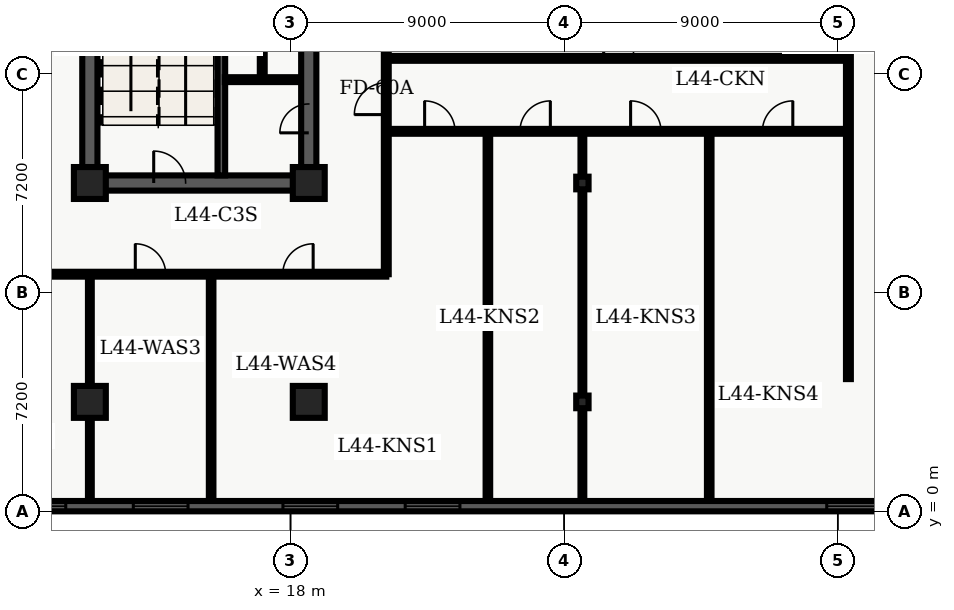
"""IFC4 building model, lengths in metres.
Left out: names, types, materials, properties, quantities, classifications, styles, units other than length and angle.
Written with IfcOpenShell. Run it as: python <this file> out.ifc"""

import sys

from ifc_helpers import new_model, entity, si_unit, converted_unit, direction, frame, origin_with_axes, origin_2d_with_axis, place, context, subcontext, project, spatial, polyline, rectangle, i_section, outline, extrude, element, fill, save


model = new_model("IFC4")
c1 = context("Model", 3, precision=1e-05, world=origin_with_axes(), true_north=direction((0.0, 1.0)))
c2 = subcontext(c1, "Body", "Model", "MODEL_VIEW")
j1 = project(units=[si_unit("LENGTHUNIT", "METRE"), converted_unit("PLANEANGLEUNIT", "DEGREE", entity("IfcPlaneAngleMeasure", 0.017), si_unit("PLANEANGLEUNIT", "RADIAN"), dimensions=[0, 0, 0, 0, 0, 0, 0])], contexts=[c1])
p1 = place(None, origin_with_axes())
s1 = spatial("IfcSite", under=j1, at=p1, CompositionType="ELEMENT")
p2 = place(p1, origin_with_axes())
s2 = spatial("IfcBuilding", under=s1, at=p2, CompositionType="ELEMENT")
p3 = place(p2, frame((0.0, 0.0, 179.7), z_axis=(0.0, 0.0, 1.0), x_axis=(1.0, 0.0, 0.0)))
s3 = spatial("IfcBuildingStorey", under=s2, at=p3, CompositionType="ELEMENT", Elevation=179.7)
p4 = place(p3, frame((11.4, 10.8, 0.0), z_axis=(0.0, 0.0, 1.0), x_axis=(0.0, 1.0, 0.0)))
e1 = element("IfcWall", 1, at=p4, inside=s3, PredefinedType="SHEAR", context=c2, shape_type="SweptSolid", body=[
    extrude(outline(polyline([(0.0, -0.25), (27.0, -0.25), (27.0, 0.25), (0.0, 0.25), (0.0, -0.25)])), origin_with_axes(), (0.0, 0.0, 1.0), 3.66),
])
p5 = place(p3, frame((11.4, 10.8, 0.0), z_axis=(0.0, 0.0, 1.0), x_axis=(1.0, 0.0, 0.0)))
e2 = element("IfcWall", 2, at=p5, inside=s3, PredefinedType="SHEAR", context=c2, shape_type="SweptSolid", body=[
    extrude(outline(polyline([(0.0, -0.25), (7.2, -0.25), (7.2, 0.25), (0.0, 0.25), (0.0, -0.25)])), origin_with_axes(), (0.0, 0.0, 1.0), 3.66),
])
p6 = place(p5, frame((2.625, 0.0, 0.0), z_axis=(0.0, 0.0, 1.0), x_axis=(1.0, 0.0, 0.0)))
e3 = element("IfcOpeningElement", 3, at=p6, cuts=e2, PredefinedType="OPENING", context=c2, shape_type="SweptSolid", body=[
    extrude(rectangle(XDim=1.05, YDim=0.52, at=origin_2d_with_axis()), origin_with_axes(), (0.0, 0.0, 1.0), 2.15),
])
p7 = place(p3, frame((18.6, 10.8, 0.0), z_axis=(0.0, 0.0, 1.0), x_axis=(0.0, 1.0, 0.0)))
e4 = element("IfcWall", 4, at=p7, inside=s3, PredefinedType="SHEAR", context=c2, shape_type="SweptSolid", body=[
    extrude(outline(polyline([(0.0, -0.25), (13.5, -0.25), (13.5, 0.25), (0.0, 0.25), (0.0, -0.25)])), origin_with_axes(), (0.0, 0.0, 1.0), 3.66),
])
p8 = place(p7, frame((11.125, 0.0, 0.0), z_axis=(0.0, 0.0, 1.0), x_axis=(1.0, 0.0, 0.0)))
e5 = element("IfcOpeningElement", 5, at=p8, cuts=e4, PredefinedType="OPENING", context=c2, shape_type="SweptSolid", body=[
    extrude(rectangle(XDim=1.05, YDim=0.52, at=origin_2d_with_axis()), origin_with_axes(), (0.0, 0.0, 1.0), 2.15),
])
p9 = place(p7, frame((2.125, 0.0, 0.0), z_axis=(0.0, 0.0, 1.0), x_axis=(1.0, 0.0, 0.0)))
e6 = element("IfcOpeningElement", 6, at=p9, cuts=e4, PredefinedType="OPENING", context=c2, shape_type="SweptSolid", body=[
    extrude(rectangle(XDim=0.95, YDim=0.52, at=origin_2d_with_axis()), origin_with_axes(), (0.0, 0.0, 1.0), 2.15),
])
p10 = place(p7, frame((6.275, 0.0, 0.0), z_axis=(0.0, 0.0, 1.0), x_axis=(1.0, 0.0, 0.0)))
e7 = element("IfcOpeningElement", 7, at=p10, cuts=e4, PredefinedType="OPENING", context=c2, shape_type="SweptSolid", body=[
    extrude(rectangle(XDim=0.95, YDim=0.52, at=origin_2d_with_axis()), origin_with_axes(), (0.0, 0.0, 1.0), 2.15),
])
p11 = place(p3, frame((15.725, 11.05, 0.0), z_axis=(0.0, 0.0, 1.0), x_axis=(0.0, 1.0, 0.0)))
e8 = element("IfcWall", 8, at=p11, inside=s3, PredefinedType="SHEAR", context=c2, shape_type="SweptSolid", body=[
    extrude(outline(polyline([(0.0, -0.125), (8.65, -0.125), (8.65, 0.125), (0.0, 0.125), (0.0, -0.125)])), origin_with_axes(), (0.0, 0.0, 1.0), 3.66),
])
for number, where, z_axis, x_axis in (
    (9, (11.4, 3.6, 0.0), (0.0, 0.0, 1.0), (1.0, 0.0, 0.0)),
    (10, (11.4, 10.8, 0.0), (0.0, 0.0, 1.0), (1.0, 0.0, 0.0)),
    (11, (18.6, 3.6, 0.0), (0.0, 0.0, 1.0), (1.0, 0.0, 0.0)),
    (12, (18.6, 10.8, 0.0), (0.0, 0.0, 1.0), (1.0, 0.0, 0.0)),
):
    element("IfcColumn", number, at=place(p3, frame(where, z_axis=z_axis, x_axis=x_axis)), inside=s3, PredefinedType="COLUMN", context=c2, shape_type="SweptSolid", body=[
        extrude(rectangle(XDim=1.05, YDim=1.05, at=origin_2d_with_axis()), origin_with_axes(), (0.0, 0.0, 1.0), 3.9),
    ])
for number, where, z_axis, x_axis in (
    (13, (27.6, 3.6, 0.0), (0.0, 0.0, 1.0), (1.0, 0.0, 0.0)),
    (14, (27.6, 10.8, 0.0), (0.0, 0.0, 1.0), (1.0, 0.0, 0.0)),
):
    element("IfcColumn", number, at=place(p3, frame(where, z_axis=z_axis, x_axis=x_axis)), inside=s3, PredefinedType="COLUMN", context=c2, shape_type="SweptSolid", body=[
        extrude(i_section(OverallWidth=0.406, OverallDepth=0.416, WebThickness=0.03, FlangeThickness=0.048, FilletRadius=0.022, at=origin_2d_with_axis()), origin_with_axes(), (0.0, 0.0, 1.0), 3.9),
    ])
p12 = place(p3, frame((15.84, 14.2, 0.0), z_axis=(0.0, 0.0, 1.0), x_axis=(1.0, 0.0, 0.0)))
e15 = element("IfcWall", 15, at=p12, inside=s3, PredefinedType="PARTITIONING", context=c2, shape_type="SweptSolid", body=[
    extrude(outline(polyline([(0.0, -0.08), (2.46, -0.08), (2.46, 0.08), (0.0, 0.08), (0.0, -0.08)])), origin_with_axes(), (0.0, 0.0, 1.0), 2.7),
])
p13 = place(p3, frame((17.07, 14.28, 0.0), z_axis=(0.0, 0.0, 1.0), x_axis=(0.0, 1.0, 0.0)))
e16 = element("IfcWall", 16, at=p13, inside=s3, PredefinedType="PARTITIONING", context=c2, shape_type="SweptSolid", body=[
    extrude(outline(polyline([(0.0, -0.08), (5.42, -0.08), (5.42, 0.08), (0.0, 0.08), (0.0, -0.08)])), origin_with_axes(), (0.0, 0.0, 1.0), 2.7),
])
p14 = place(p13, frame((2.6, 0.0, 0.0), z_axis=(0.0, 0.0, 1.0), x_axis=(1.0, 0.0, 0.0)))
e17 = element("IfcOpeningElement", 17, at=p14, cuts=e16, PredefinedType="OPENING", context=c2, shape_type="SweptSolid", body=[
    extrude(rectangle(XDim=0.9, YDim=0.18, at=origin_2d_with_axis()), origin_with_axes(), (0.0, 0.0, 1.0), 2.15),
])
p15 = place(p3, frame((2.6, 7.8, 0.0), z_axis=(0.0, 0.0, 1.0), x_axis=(1.0, 0.0, 0.0)))
e18 = element("IfcWall", 18, at=p15, inside=s3, PredefinedType="PARTITIONING", context=c2, shape_type="SweptSolid", body=[
    extrude(outline(polyline([(0.0, -0.08), (18.55, -0.08), (18.55, 0.08), (0.0, 0.08), (0.0, -0.08)])), origin_with_axes(), (0.0, 0.0, 1.0), 2.7),
])
p16 = place(p15, frame((1.851, 0.0, 0.0), z_axis=(0.0, 0.0, 1.0), x_axis=(1.0, 0.0, 0.0)))
e19 = element("IfcOpeningElement", 19, at=p16, cuts=e18, PredefinedType="OPENING", context=c2, shape_type="SweptSolid", body=[
    extrude(rectangle(XDim=1.0, YDim=0.18, at=origin_2d_with_axis()), origin_with_axes(), (0.0, 0.0, 1.0), 2.15),
])
p17 = place(p15, frame((6.255, 0.0, 0.0), z_axis=(0.0, 0.0, 1.0), x_axis=(1.0, 0.0, 0.0)))
e20 = element("IfcOpeningElement", 20, at=p17, cuts=e18, PredefinedType="OPENING", context=c2, shape_type="SweptSolid", body=[
    extrude(rectangle(XDim=1.0, YDim=0.18, at=origin_2d_with_axis()), origin_with_axes(), (0.0, 0.0, 1.0), 2.15),
])
p18 = place(p15, frame((10.794, 0.0, 0.0), z_axis=(0.0, 0.0, 1.0), x_axis=(1.0, 0.0, 0.0)))
e21 = element("IfcOpeningElement", 21, at=p18, cuts=e18, PredefinedType="OPENING", context=c2, shape_type="SweptSolid", body=[
    extrude(rectangle(XDim=1.0, YDim=0.18, at=origin_2d_with_axis()), origin_with_axes(), (0.0, 0.0, 1.0), 2.15),
])
p19 = place(p15, frame((15.645, 0.0, 0.0), z_axis=(0.0, 0.0, 1.0), x_axis=(1.0, 0.0, 0.0)))
e22 = element("IfcOpeningElement", 22, at=p19, cuts=e18, PredefinedType="OPENING", context=c2, shape_type="SweptSolid", body=[
    extrude(rectangle(XDim=1.0, YDim=0.18, at=origin_2d_with_axis()), origin_with_axes(), (0.0, 0.0, 1.0), 2.15),
])
p20 = place(p3, frame((21.15, 7.8, 0.0), z_axis=(0.0, 0.0, 1.0), x_axis=(0.0, 1.0, 0.0)))
e23 = element("IfcWall", 23, at=p20, inside=s3, PredefinedType="PARTITIONING", context=c2, shape_type="SweptSolid", body=[
    extrude(outline(polyline([(0.0, -0.08), (32.7, -0.08), (32.7, 0.08), (0.0, 0.08), (0.0, -0.08)])), origin_with_axes(), (0.0, 0.0, 1.0), 2.7),
])
p21 = place(p20, frame((16.495, 0.0, 0.0), z_axis=(0.0, 0.0, 1.0), x_axis=(1.0, 0.0, 0.0)))
e24 = element("IfcOpeningElement", 24, at=p21, cuts=e23, PredefinedType="OPENING", context=c2, shape_type="SweptSolid", body=[
    extrude(rectangle(XDim=1.0, YDim=0.18, at=origin_2d_with_axis()), origin_with_axes(), (0.0, 0.0, 1.0), 2.15),
])
p22 = place(p20, frame((22.148, 0.0, 0.0), z_axis=(0.0, 0.0, 1.0), x_axis=(1.0, 0.0, 0.0)))
e25 = element("IfcOpeningElement", 25, at=p22, cuts=e23, PredefinedType="OPENING", context=c2, shape_type="SweptSolid", body=[
    extrude(rectangle(XDim=1.0, YDim=0.18, at=origin_2d_with_axis()), origin_with_axes(), (0.0, 0.0, 1.0), 2.15),
])
p23 = place(p20, frame((28.902, 0.0, 0.0), z_axis=(0.0, 0.0, 1.0), x_axis=(1.0, 0.0, 0.0)))
e26 = element("IfcOpeningElement", 26, at=p23, cuts=e23, PredefinedType="OPENING", context=c2, shape_type="SweptSolid", body=[
    extrude(rectangle(XDim=1.0, YDim=0.18, at=origin_2d_with_axis()), origin_with_axes(), (0.0, 0.0, 1.0), 2.15),
])
p24 = place(p20, frame((5.775, 0.0, 0.0), z_axis=(0.0, 0.0, 1.0), x_axis=(1.0, 0.0, 0.0)))
e27 = element("IfcOpeningElement", 27, at=p24, cuts=e23, PredefinedType="OPENING", context=c2, shape_type="SweptSolid", body=[
    extrude(rectangle(XDim=1.05, YDim=0.18, at=origin_2d_with_axis()), origin_with_axes(), (0.0, 0.0, 1.0), 2.15),
])
p25 = place(p3, frame((11.4, 0.335, 0.0), z_axis=(0.0, 0.0, 1.0), x_axis=(0.0, 1.0, 0.0)))
e28 = element("IfcWall", 28, at=p25, inside=s3, PredefinedType="PARTITIONING", context=c2, shape_type="SweptSolid", body=[
    extrude(outline(polyline([(0.0, -0.062), (7.365, -0.062), (7.365, 0.062), (0.0, 0.062), (0.0, -0.062)])), origin_with_axes(), (0.0, 0.0, 1.0), 2.7),
])
p26 = place(p3, frame((15.389, 0.335, 0.0), z_axis=(0.0, 0.0, 1.0), x_axis=(0.0, 1.0, 0.0)))
e29 = element("IfcWall", 29, at=p26, inside=s3, PredefinedType="PARTITIONING", context=c2, shape_type="SweptSolid", body=[
    extrude(outline(polyline([(0.0, -0.075), (7.365, -0.075), (7.365, 0.075), (0.0, 0.075), (0.0, -0.075)])), origin_with_axes(), (0.0, 0.0, 1.0), 2.7),
])
p27 = place(p3, frame((21.15, 12.5, 0.0), z_axis=(0.0, 0.0, 1.0), x_axis=(1.0, 0.0, 0.0)))
e30 = element("IfcWall", 30, at=p27, inside=s3, PredefinedType="PARTITIONING", context=c2, shape_type="SweptSolid", body=[
    extrude(outline(polyline([(0.0, -0.08), (15.2, -0.08), (15.2, 0.08), (0.0, 0.08), (0.0, -0.08)])), origin_with_axes(), (0.0, 0.0, 1.0), 2.7),
])
p28 = place(p27, frame((1.761, 0.0, 0.0), z_axis=(0.0, 0.0, 1.0), x_axis=(1.0, 0.0, 0.0)))
e31 = element("IfcOpeningElement", 31, at=p28, cuts=e30, PredefinedType="OPENING", context=c2, shape_type="SweptSolid", body=[
    extrude(rectangle(XDim=1.0, YDim=0.18, at=origin_2d_with_axis()), origin_with_axes(), (0.0, 0.0, 1.0), 2.15),
])
p29 = place(p27, frame((4.896, 0.0, 0.0), z_axis=(0.0, 0.0, 1.0), x_axis=(1.0, 0.0, 0.0)))
e32 = element("IfcOpeningElement", 32, at=p29, cuts=e30, PredefinedType="OPENING", context=c2, shape_type="SweptSolid", body=[
    extrude(rectangle(XDim=1.0, YDim=0.18, at=origin_2d_with_axis()), origin_with_axes(), (0.0, 0.0, 1.0), 2.15),
])
p30 = place(p27, frame((8.536, 0.0, 0.0), z_axis=(0.0, 0.0, 1.0), x_axis=(1.0, 0.0, 0.0)))
e33 = element("IfcOpeningElement", 33, at=p30, cuts=e30, PredefinedType="OPENING", context=c2, shape_type="SweptSolid", body=[
    extrude(rectangle(XDim=1.0, YDim=0.18, at=origin_2d_with_axis()), origin_with_axes(), (0.0, 0.0, 1.0), 2.15),
])
p31 = place(p27, frame((12.871, 0.0, 0.0), z_axis=(0.0, 0.0, 1.0), x_axis=(1.0, 0.0, 0.0)))
e34 = element("IfcOpeningElement", 34, at=p31, cuts=e30, PredefinedType="OPENING", context=c2, shape_type="SweptSolid", body=[
    extrude(rectangle(XDim=1.0, YDim=0.18, at=origin_2d_with_axis()), origin_with_axes(), (0.0, 0.0, 1.0), 2.15),
])
p32 = place(p3, frame((21.15, 14.9, 0.0), z_axis=(0.0, 0.0, 1.0), x_axis=(1.0, 0.0, 0.0)))
e35 = element("IfcWall", 35, at=p32, inside=s3, PredefinedType="PARTITIONING", context=c2, shape_type="SweptSolid", body=[
    extrude(outline(polyline([(0.0, -0.08), (15.2, -0.08), (15.2, 0.08), (0.0, 0.08), (0.0, -0.08)])), origin_with_axes(), (0.0, 0.0, 1.0), 2.7),
])
p33 = place(p32, frame((7.65, 0.0, 0.0), z_axis=(0.0, 0.0, 1.0), x_axis=(1.0, 0.0, 0.0)))
e36 = element("IfcOpeningElement", 36, at=p33, cuts=e35, PredefinedType="OPENING", context=c2, shape_type="SweptSolid", body=[
    extrude(rectangle(XDim=1.0, YDim=0.18, at=origin_2d_with_axis()), origin_with_axes(), (0.0, 0.0, 1.0), 2.15),
])
p34 = place(p3, frame((36.35, 4.35, 0.0), z_axis=(0.0, 0.0, 1.0), x_axis=(0.0, 1.0, 0.0)))
e37 = element("IfcWall", 37, at=p34, inside=s3, PredefinedType="PARTITIONING", context=c2, shape_type="SweptSolid", body=[
    extrude(outline(polyline([(0.0, -0.08), (16.95, -0.08), (16.95, 0.08), (0.0, 0.08), (0.0, -0.08)])), origin_with_axes(), (0.0, 0.0, 1.0), 2.7),
])
p35 = place(p3, frame((24.492, 0.335, 0.0), z_axis=(0.0, 0.0, 1.0), x_axis=(0.0, 1.0, 0.0)))
e38 = element("IfcWall", 38, at=p35, inside=s3, PredefinedType="PARTITIONING", context=c2, shape_type="SweptSolid", body=[
    extrude(outline(polyline([(0.0, -0.075), (12.045, -0.075), (12.045, 0.075), (0.0, 0.075), (0.0, -0.075)])), origin_with_axes(), (0.0, 0.0, 1.0), 2.7),
])
p36 = place(p3, frame((27.6, 0.335, 0.0), z_axis=(0.0, 0.0, 1.0), x_axis=(0.0, 1.0, 0.0)))
e39 = element("IfcWall", 39, at=p36, inside=s3, PredefinedType="PARTITIONING", context=c2, shape_type="SweptSolid", body=[
    extrude(outline(polyline([(0.0, -0.062), (12.045, -0.062), (12.045, 0.062), (0.0, 0.062), (0.0, -0.062)])), origin_with_axes(), (0.0, 0.0, 1.0), 2.7),
])
p37 = place(p3, frame((31.772, 0.335, 0.0), z_axis=(0.0, 0.0, 1.0), x_axis=(0.0, 1.0, 0.0)))
e40 = element("IfcWall", 40, at=p37, inside=s3, PredefinedType="PARTITIONING", context=c2, shape_type="SweptSolid", body=[
    extrude(outline(polyline([(0.0, -0.075), (12.045, -0.075), (12.045, 0.075), (0.0, 0.075), (0.0, -0.075)])), origin_with_axes(), (0.0, 0.0, 1.0), 2.7),
])
p38 = place(p3, frame((57.26, 0.17, 0.0), z_axis=(0.0, 0.0, 1.0), x_axis=(-1.0, 0.0, 0.0)))
e41 = element("IfcWall", 41, at=p38, inside=s3, PredefinedType="SOLIDWALL", context=c2, shape_type="SweptSolid", body=[
    extrude(outline(polyline([(0.0, -0.17), (54.86, -0.17), (54.86, 0.17), (0.0, 0.17), (0.0, -0.17)])), origin_with_axes(), (0.0, 0.0, 1.0), 3.66),
])
p39 = place(p38, frame((2.836, 0.0, 0.45), z_axis=(0.0, 0.0, 1.0), x_axis=(1.0, 0.0, 0.0)))
e42 = element("IfcOpeningElement", 42, at=p39, cuts=e41, PredefinedType="OPENING", context=c2, shape_type="SweptSolid", body=[
    extrude(rectangle(XDim=1.8, YDim=0.36, at=origin_2d_with_axis()), origin_with_axes(), (0.0, 0.0, 1.0), 2.1),
])
p40 = place(p38, frame((7.307, 0.0, 0.45), z_axis=(0.0, 0.0, 1.0), x_axis=(1.0, 0.0, 0.0)))
e43 = element("IfcOpeningElement", 43, at=p40, cuts=e41, PredefinedType="OPENING", context=c2, shape_type="SweptSolid", body=[
    extrude(rectangle(XDim=1.8, YDim=0.36, at=origin_2d_with_axis()), origin_with_axes(), (0.0, 0.0, 1.0), 2.1),
])
p41 = place(p38, frame((11.779, 0.0, 0.45), z_axis=(0.0, 0.0, 1.0), x_axis=(1.0, 0.0, 0.0)))
e44 = element("IfcOpeningElement", 44, at=p41, cuts=e41, PredefinedType="OPENING", context=c2, shape_type="SweptSolid", body=[
    extrude(rectangle(XDim=1.8, YDim=0.36, at=origin_2d_with_axis()), origin_with_axes(), (0.0, 0.0, 1.0), 2.1),
])
p42 = place(p38, frame((16.251, 0.0, 0.45), z_axis=(0.0, 0.0, 1.0), x_axis=(1.0, 0.0, 0.0)))
e45 = element("IfcOpeningElement", 45, at=p42, cuts=e41, PredefinedType="OPENING", context=c2, shape_type="SweptSolid", body=[
    extrude(rectangle(XDim=1.8, YDim=0.36, at=origin_2d_with_axis()), origin_with_axes(), (0.0, 0.0, 1.0), 2.1),
])
p43 = place(p38, frame((20.723, 0.0, 0.45), z_axis=(0.0, 0.0, 1.0), x_axis=(1.0, 0.0, 0.0)))
e46 = element("IfcOpeningElement", 46, at=p43, cuts=e41, PredefinedType="OPENING", context=c2, shape_type="SweptSolid", body=[
    extrude(rectangle(XDim=1.8, YDim=0.36, at=origin_2d_with_axis()), origin_with_axes(), (0.0, 0.0, 1.0), 2.1),
])
p44 = place(p38, frame((34.588, 0.0, 0.45), z_axis=(0.0, 0.0, 1.0), x_axis=(1.0, 0.0, 0.0)))
e47 = element("IfcOpeningElement", 47, at=p44, cuts=e41, PredefinedType="OPENING", context=c2, shape_type="SweptSolid", body=[
    extrude(rectangle(XDim=1.8, YDim=0.36, at=origin_2d_with_axis()), origin_with_axes(), (0.0, 0.0, 1.0), 2.1),
])
p45 = place(p38, frame((38.609, 0.0, 0.45), z_axis=(0.0, 0.0, 1.0), x_axis=(1.0, 0.0, 0.0)))
e48 = element("IfcOpeningElement", 48, at=p45, cuts=e41, PredefinedType="OPENING", context=c2, shape_type="SweptSolid", body=[
    extrude(rectangle(XDim=1.8, YDim=0.36, at=origin_2d_with_axis()), origin_with_axes(), (0.0, 0.0, 1.0), 2.1),
])
p46 = place(p38, frame((43.531, 0.0, 0.45), z_axis=(0.0, 0.0, 1.0), x_axis=(1.0, 0.0, 0.0)))
e49 = element("IfcOpeningElement", 49, at=p46, cuts=e41, PredefinedType="OPENING", context=c2, shape_type="SweptSolid", body=[
    extrude(rectangle(XDim=1.8, YDim=0.36, at=origin_2d_with_axis()), origin_with_axes(), (0.0, 0.0, 1.0), 2.1),
])
p47 = place(p38, frame((47.553, 0.0, 0.45), z_axis=(0.0, 0.0, 1.0), x_axis=(1.0, 0.0, 0.0)))
e50 = element("IfcOpeningElement", 50, at=p47, cuts=e41, PredefinedType="OPENING", context=c2, shape_type="SweptSolid", body=[
    extrude(rectangle(XDim=1.8, YDim=0.36, at=origin_2d_with_axis()), origin_with_axes(), (0.0, 0.0, 1.0), 2.1),
])
p48 = place(p38, frame((52.474, 0.0, 0.45), z_axis=(0.0, 0.0, 1.0), x_axis=(1.0, 0.0, 0.0)))
e51 = element("IfcOpeningElement", 51, at=p48, cuts=e41, PredefinedType="OPENING", context=c2, shape_type="SweptSolid", body=[
    extrude(rectangle(XDim=1.8, YDim=0.36, at=origin_2d_with_axis()), origin_with_axes(), (0.0, 0.0, 1.0), 2.1),
])
p49 = place(p5, frame((2.625, 0.0, 0.0), z_axis=(0.0, 0.0, 1.0), x_axis=(1.0, 0.0, 0.0)))
e52 = element("IfcDoor", 52, at=p49, inside=s3, OperationType="SINGLE_SWING_LEFT", PredefinedType="DOOR", context=c2, shape_type="SweptSolid", body=[
    extrude(rectangle(XDim=1.05, YDim=0.09, at=origin_2d_with_axis()), origin_with_axes(), (0.0, 0.0, 1.0), 2.15),
])
fill(e3, e52)
p50 = place(p7, frame((2.125, 0.0, 0.0), z_axis=(0.0, 0.0, 1.0), x_axis=(1.0, 0.0, 0.0)))
e53 = element("IfcDoor", 53, at=p50, inside=s3, OperationType="SINGLE_SWING_LEFT", PredefinedType="DOOR", context=c2, shape_type="SweptSolid", body=[
    extrude(rectangle(XDim=0.95, YDim=0.09, at=origin_2d_with_axis()), origin_with_axes(), (0.0, 0.0, 1.0), 2.15),
])
fill(e6, e53)
p51 = place(p15, frame((10.794, 0.0, 0.0), z_axis=(0.0, 0.0, 1.0), x_axis=(1.0, 0.0, 0.0)))
e54 = element("IfcDoor", 54, at=p51, inside=s3, OperationType="SINGLE_SWING_LEFT", PredefinedType="DOOR", context=c2, shape_type="SweptSolid", body=[
    extrude(rectangle(XDim=1.0, YDim=0.09, at=origin_2d_with_axis()), origin_with_axes(), (0.0, 0.0, 1.0), 2.15),
])
fill(e21, e54)
p52 = place(p15, frame((15.645, 0.0, 0.0), z_axis=(0.0, 0.0, 1.0), x_axis=(1.0, 0.0, 0.0)))
e55 = element("IfcDoor", 55, at=p52, inside=s3, OperationType="SINGLE_SWING_RIGHT", PredefinedType="DOOR", context=c2, shape_type="SweptSolid", body=[
    extrude(rectangle(XDim=1.0, YDim=0.09, at=origin_2d_with_axis()), origin_with_axes(), (0.0, 0.0, 1.0), 2.15),
])
fill(e22, e55)
p53 = place(p20, frame((5.775, 0.0, 0.0), z_axis=(0.0, 0.0, 1.0), x_axis=(1.0, 0.0, 0.0)))
e56 = element("IfcDoor", 56, at=p53, inside=s3, OperationType="SINGLE_SWING_LEFT", PredefinedType="DOOR", context=c2, shape_type="SweptSolid", body=[
    extrude(rectangle(XDim=1.05, YDim=0.09, at=origin_2d_with_axis()), origin_with_axes(), (0.0, 0.0, 1.0), 2.15),
])
fill(e27, e56)
p54 = place(p27, frame((1.761, 0.0, 0.0), z_axis=(0.0, 0.0, 1.0), x_axis=(1.0, 0.0, 0.0)))
e57 = element("IfcDoor", 57, at=p54, inside=s3, OperationType="SINGLE_SWING_LEFT", PredefinedType="DOOR", context=c2, shape_type="SweptSolid", body=[
    extrude(rectangle(XDim=1.0, YDim=0.09, at=origin_2d_with_axis()), origin_with_axes(), (0.0, 0.0, 1.0), 2.15),
])
fill(e31, e57)
p55 = place(p27, frame((4.896, 0.0, 0.0), z_axis=(0.0, 0.0, 1.0), x_axis=(1.0, 0.0, 0.0)))
e58 = element("IfcDoor", 58, at=p55, inside=s3, OperationType="SINGLE_SWING_RIGHT", PredefinedType="DOOR", context=c2, shape_type="SweptSolid", body=[
    extrude(rectangle(XDim=1.0, YDim=0.09, at=origin_2d_with_axis()), origin_with_axes(), (0.0, 0.0, 1.0), 2.15),
])
fill(e32, e58)
p56 = place(p27, frame((8.536, 0.0, 0.0), z_axis=(0.0, 0.0, 1.0), x_axis=(1.0, 0.0, 0.0)))
e59 = element("IfcDoor", 59, at=p56, inside=s3, OperationType="SINGLE_SWING_LEFT", PredefinedType="DOOR", context=c2, shape_type="SweptSolid", body=[
    extrude(rectangle(XDim=1.0, YDim=0.09, at=origin_2d_with_axis()), origin_with_axes(), (0.0, 0.0, 1.0), 2.15),
])
fill(e33, e59)
p57 = place(p27, frame((12.871, 0.0, 0.0), z_axis=(0.0, 0.0, 1.0), x_axis=(1.0, 0.0, 0.0)))
e60 = element("IfcDoor", 60, at=p57, inside=s3, OperationType="SINGLE_SWING_RIGHT", PredefinedType="DOOR", context=c2, shape_type="SweptSolid", body=[
    extrude(rectangle(XDim=1.0, YDim=0.09, at=origin_2d_with_axis()), origin_with_axes(), (0.0, 0.0, 1.0), 2.15),
])
fill(e34, e60)
p58 = place(p32, frame((7.65, 0.0, 0.0), z_axis=(0.0, 0.0, 1.0), x_axis=(1.0, 0.0, 0.0)))
e61 = element("IfcDoor", 61, at=p58, inside=s3, OperationType="SINGLE_SWING_LEFT", PredefinedType="DOOR", context=c2, shape_type="SweptSolid", body=[
    extrude(rectangle(XDim=1.0, YDim=0.09, at=origin_2d_with_axis()), origin_with_axes(), (0.0, 0.0, 1.0), 2.15),
])
fill(e36, e61)
p59 = place(p38, frame((20.723, 0.0, 0.45), z_axis=(0.0, 0.0, 1.0), x_axis=(1.0, 0.0, 0.0)))
e62 = element("IfcWindow", 62, at=p59, inside=s3, PredefinedType="WINDOW", context=c2, shape_type="SweptSolid", body=[
    extrude(rectangle(XDim=1.8, YDim=0.09, at=origin_2d_with_axis()), origin_with_axes(), (0.0, 0.0, 1.0), 2.1),
])
fill(e46, e62)
p60 = place(p38, frame((34.588, 0.0, 0.45), z_axis=(0.0, 0.0, 1.0), x_axis=(1.0, 0.0, 0.0)))
e63 = element("IfcWindow", 63, at=p60, inside=s3, PredefinedType="WINDOW", context=c2, shape_type="SweptSolid", body=[
    extrude(rectangle(XDim=1.8, YDim=0.09, at=origin_2d_with_axis()), origin_with_axes(), (0.0, 0.0, 1.0), 2.1),
])
fill(e47, e63)
p61 = place(p38, frame((38.609, 0.0, 0.45), z_axis=(0.0, 0.0, 1.0), x_axis=(1.0, 0.0, 0.0)))
e64 = element("IfcWindow", 64, at=p61, inside=s3, PredefinedType="WINDOW", context=c2, shape_type="SweptSolid", body=[
    extrude(rectangle(XDim=1.8, YDim=0.09, at=origin_2d_with_axis()), origin_with_axes(), (0.0, 0.0, 1.0), 2.1),
])
fill(e48, e64)
p62 = place(p38, frame((43.531, 0.0, 0.45), z_axis=(0.0, 0.0, 1.0), x_axis=(1.0, 0.0, 0.0)))
e65 = element("IfcWindow", 65, at=p62, inside=s3, PredefinedType="WINDOW", context=c2, shape_type="SweptSolid", body=[
    extrude(rectangle(XDim=1.8, YDim=0.09, at=origin_2d_with_axis()), origin_with_axes(), (0.0, 0.0, 1.0), 2.1),
])
fill(e49, e65)
p63 = place(p38, frame((47.553, 0.0, 0.45), z_axis=(0.0, 0.0, 1.0), x_axis=(1.0, 0.0, 0.0)))
e66 = element("IfcWindow", 66, at=p63, inside=s3, PredefinedType="WINDOW", context=c2, shape_type="SweptSolid", body=[
    extrude(rectangle(XDim=1.8, YDim=0.09, at=origin_2d_with_axis()), origin_with_axes(), (0.0, 0.0, 1.0), 2.1),
])
fill(e50, e66)
save(model, sys.argv[1])
